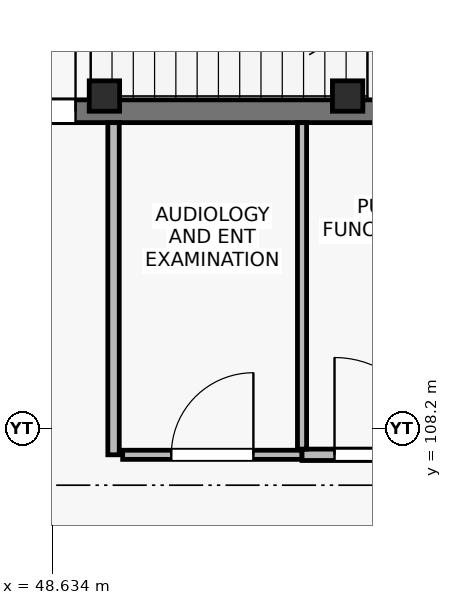
"""IFC4 building model, lengths in metres.
Left out: names, types, materials, properties, quantities, classifications, styles, units other than length and angle.
Written with IfcOpenShell. Run it as: python <this file> out.ifc"""

import sys

from ifc_helpers import new_model, si_unit, direction, frame, frame_2d, origin, origin_2d, place, context, subcontext, project, spatial, rectangle, extrude, element, fill, save


model = new_model("IFC4")
c1 = context("Model", 3, precision=1e-05, world=origin(), true_north=direction((0.0, 1.0)))
c2 = subcontext(c1, "Body", "Model", "MODEL_VIEW")
j1 = project(units=[si_unit("LENGTHUNIT", "METRE"), si_unit("PLANEANGLEUNIT", "RADIAN")], contexts=[c1])
p1 = place(None, origin())
s1 = spatial("IfcSite", under=j1, at=p1, CompositionType="ELEMENT")
p2 = place(p1, origin())
s2 = spatial("IfcBuilding", under=s1, at=p2, CompositionType="ELEMENT")
p3 = place(p2, frame((0.0, 0.0, 4.8)))
s3 = spatial("IfcBuildingStorey", under=s2, at=p3, CompositionType="ELEMENT", Elevation=4.8)
for number, where, z_axis, x_axis in (
    (1, (49.32, 112.57, 0.0), (0.0, 0.0, 1.0), (1.0, 0.0, 0.0)),
    (2, (52.52, 112.57, 0.0), (0.0, 0.0, 1.0), (1.0, 0.0, 0.0)),
):
    element("IfcColumn", number, at=place(p3, frame(where, z_axis=z_axis, x_axis=x_axis)), inside=s3, PredefinedType="COLUMN", context=c2, shape_type="SweptSolid", body=[
        extrude(rectangle(XDim=0.4, YDim=0.4, at=origin_2d()), origin(), (0.0, 0.0, 1.0), 4.8),
    ])
p4 = place(p3, frame((46.95, 112.37, 0.0), z_axis=(0.0, 0.0, 1.0), x_axis=(1.0, 0.0, 0.0)))
e3 = element("IfcWall", 3, at=p4, inside=s3, PredefinedType="SHEAR", context=c2, shape_type="SweptSolid", body=[
    extrude(rectangle(XDim=7.59, YDim=0.3, at=frame_2d((3.795, 0.0))), origin(), (0.0, 0.0, 1.0), 4.54),
])
p5 = place(p4, frame((0.59, 0.0, 0.0)))
e4 = element("IfcOpeningElement", 4, at=p5, cuts=e3, PredefinedType="OPENING", context=c2, shape_type="SweptSolid", body=[
    extrude(rectangle(XDim=1.4, YDim=2.2, at=frame_2d((0.7, 1.1))), frame((0.0, 0.16, 0.0), z_axis=(0.0, -1.0, 0.0), x_axis=(1.0, 0.0, 0.0)), (0.0, 0.0, 1.0), 0.32),
])
p6 = place(p3, frame((49.44, 107.85, 0.0), z_axis=(0.0, 0.0, 1.0), x_axis=(0.0, 1.0, 0.0)))
e5 = element("IfcWall", 5, at=p6, inside=s3, PredefinedType="PARTITIONING", context=c2, shape_type="SweptSolid", body=[
    extrude(rectangle(XDim=4.37, YDim=0.15, at=frame_2d((2.185, 0.0))), origin(), (0.0, 0.0, 1.0), 4.54),
])
p7 = place(p3, frame((49.56, 107.85, 0.0), z_axis=(0.0, 0.0, 1.0), x_axis=(1.0, 0.0, 0.0)))
e6 = element("IfcWall", 6, at=p7, inside=s3, PredefinedType="PARTITIONING", context=c2, shape_type="SweptSolid", body=[
    extrude(rectangle(XDim=2.36, YDim=0.12, at=frame_2d((1.18, 0.0))), origin(), (0.0, 0.0, 1.0), 4.04),
])
p8 = place(p7, frame((0.64, 0.0, 0.0)))
e7 = element("IfcOpeningElement", 7, at=p8, cuts=e6, PredefinedType="OPENING", context=c2, shape_type="SweptSolid", body=[
    extrude(rectangle(XDim=1.08, YDim=2.2, at=frame_2d((0.54, 1.1))), frame((0.0, 0.07, 0.0), z_axis=(0.0, -1.0, 0.0), x_axis=(1.0, 0.0, 0.0)), (0.0, 0.0, 1.0), 0.14),
])
p9 = place(p3, frame((51.92, 107.85, 0.0), z_axis=(0.0, 0.0, 1.0), x_axis=(1.0, 0.0, 0.0)))
e8 = element("IfcWall", 8, at=p9, inside=s3, PredefinedType="PARTITIONING", context=c2, shape_type="SweptSolid", body=[
    extrude(rectangle(XDim=3.03, YDim=0.15, at=frame_2d((1.515, 0.0))), origin(), (0.0, 0.0, 1.0), 4.04),
])
p10 = place(p9, frame((0.427, 0.0, 0.0)))
e9 = element("IfcOpeningElement", 9, at=p10, cuts=e8, PredefinedType="OPENING", context=c2, shape_type="SweptSolid", body=[
    extrude(rectangle(XDim=1.28, YDim=2.25, at=frame_2d((0.64, 1.125))), frame((0.0, 0.085, 0.0), z_axis=(0.0, -1.0, 0.0), x_axis=(1.0, 0.0, 0.0)), (0.0, 0.0, 1.0), 0.17),
])
p11 = place(p3, frame((51.92, 107.925, 0.0), z_axis=(0.0, 0.0, 1.0), x_axis=(0.0, 1.0, 0.0)))
e10 = element("IfcWall", 10, at=p11, inside=s3, PredefinedType="PARTITIONING", context=c2, shape_type="SweptSolid", body=[
    extrude(rectangle(XDim=4.295, YDim=0.12, at=frame_2d((2.147, 0.0))), origin(), (0.0, 0.0, 1.0), 4.54),
])
p12 = place(p5, origin())
e11 = element("IfcDoor", 11, at=p12, inside=s3, OperationType="SINGLE_SWING_RIGHT", PredefinedType="DOOR", context=c2, shape_type="SweptSolid", body=[
    extrude(rectangle(XDim=1.4, YDim=2.2, at=frame_2d((0.7, 1.1))), frame((0.0, 0.025, 0.0), z_axis=(0.0, -1.0, 0.0), x_axis=(1.0, 0.0, 0.0)), (0.0, 0.0, 1.0), 0.05),
])
fill(e4, e11)
p13 = place(p8, origin())
e12 = element("IfcDoor", 12, at=p13, inside=s3, OperationType="SINGLE_SWING_RIGHT", PredefinedType="DOOR", context=c2, shape_type="SweptSolid", body=[
    extrude(rectangle(XDim=1.08, YDim=2.2, at=frame_2d((0.54, 1.1))), frame((0.0, 0.025, 0.0), z_axis=(0.0, -1.0, 0.0), x_axis=(1.0, 0.0, 0.0)), (0.0, 0.0, 1.0), 0.05),
])
fill(e7, e12)
p14 = place(p10, origin())
e13 = element("IfcDoor", 13, at=p14, inside=s3, OperationType="SINGLE_SWING_LEFT", PredefinedType="DOOR", context=c2, shape_type="SweptSolid", body=[
    extrude(rectangle(XDim=1.28, YDim=2.25, at=frame_2d((0.64, 1.125))), frame((0.0, 0.025, 0.0), z_axis=(0.0, -1.0, 0.0), x_axis=(1.0, 0.0, 0.0)), (0.0, 0.0, 1.0), 0.05),
])
fill(e9, e13)
save(model, sys.argv[1])
